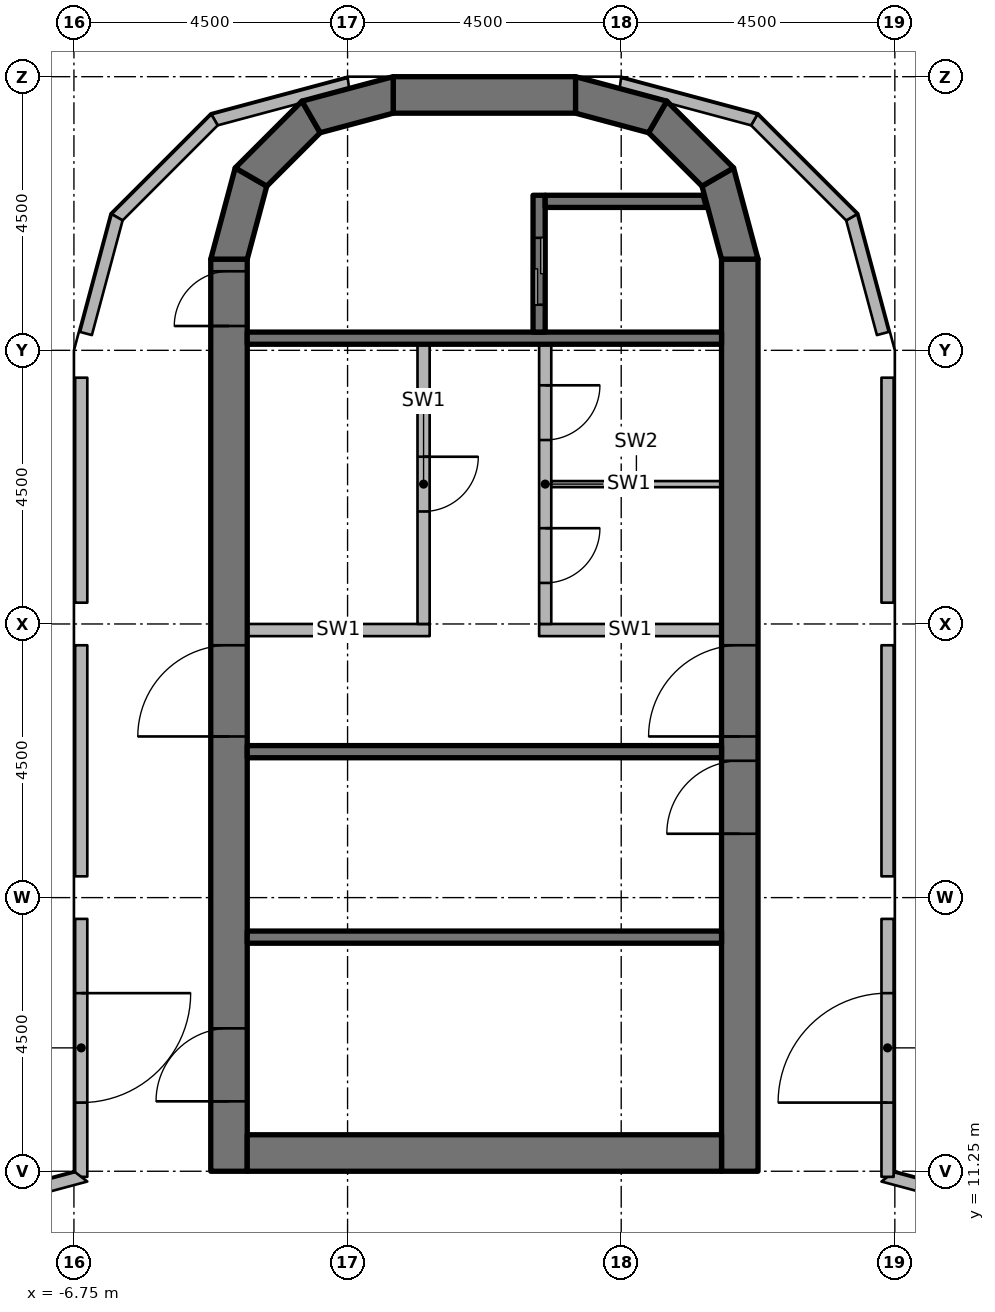
"""IFC4 building model, lengths in metres.
Left out: names, types, materials, properties, quantities, classifications, styles, units other than length and angle.
Written with IfcOpenShell. Run it as: python <this file> out.ifc"""

import sys

from ifc_helpers import new_model, si_unit, direction, frame, frame_2d, origin, origin_2d, place, context, subcontext, project, spatial, polyline, rectangle, outline, extrude, element, fill, save


model = new_model("IFC4")
c1 = context("Model", 3, precision=1e-05, world=origin(), true_north=direction((0.0, 1.0)))
c2 = subcontext(c1, "Body", "Model", "MODEL_VIEW")
j1 = project(units=[si_unit("LENGTHUNIT", "METRE"), si_unit("PLANEANGLEUNIT", "RADIAN")], contexts=[c1])
p1 = place(None, origin())
s1 = spatial("IfcSite", under=j1, at=p1, CompositionType="ELEMENT")
p2 = place(p1, origin())
s2 = spatial("IfcBuilding", under=s1, at=p2, CompositionType="ELEMENT")
p3 = place(p2, frame((0.0, 0.0, 244.8)))
s3 = spatial("IfcBuildingStorey", under=s2, at=p3, CompositionType="ELEMENT", Elevation=244.8)
for number, where, z_axis, x_axis in (
    (1, (-6.25, 10.75, 0.0), (0.0, 0.0, 1.0), (1.0, 0.0, 0.0)),
    (2, (-6.25, 15.75, 0.0), (0.0, 0.0, 1.0), (1.0, 0.0, 0.0)),
    (3, (-6.25, 20.25, 0.0), (0.0, 0.0, 1.0), (1.0, 0.0, 0.0)),
    (4, (-6.25, 24.65, 0.0), (0.0, 0.0, 1.0), (1.0, 0.0, 0.0)),
    (5, (6.25, 10.75, 0.0), (0.0, 0.0, 1.0), (1.0, 0.0, 0.0)),
    (6, (6.25, 15.75, 0.0), (0.0, 0.0, 1.0), (1.0, 0.0, 0.0)),
    (7, (6.25, 20.25, 0.0), (0.0, 0.0, 1.0), (1.0, 0.0, 0.0)),
    (8, (6.25, 24.65, 0.0), (0.0, 0.0, 1.0), (1.0, 0.0, 0.0)),
):
    element("IfcColumn", number, at=place(p3, frame(where, z_axis=z_axis, x_axis=x_axis)), inside=s3, PredefinedType="COLUMN", context=c2, shape_type="SweptSolid", body=[
        extrude(rectangle(XDim=0.7, YDim=0.7, at=origin_2d()), origin(), (0.0, 0.0, 1.0), 4.85),
    ])
p4 = place(p3, frame((-4.2, 11.25, 0.0), z_axis=(0.0, 0.0, 1.0), x_axis=(0.0, 1.0, 0.0)))
e9 = element("IfcWall", 9, at=p4, inside=s3, PredefinedType="SHEAR", context=c2, shape_type="SweptSolid", body=[
    extrude(rectangle(XDim=15.0, YDim=0.6, at=frame_2d((7.5, 0.0))), origin(), (0.0, 0.0, 1.0), 5.0),
])
p5 = place(p4, frame((7.15, 0.0, 0.0)))
e10 = element("IfcOpeningElement", 10, at=p5, cuts=e9, PredefinedType="OPENING", context=c2, shape_type="SweptSolid", body=[
    extrude(rectangle(XDim=1.5, YDim=2.3, at=frame_2d((0.75, 1.15))), frame((0.0, 0.31, 0.0), z_axis=(0.0, -1.0, 0.0), x_axis=(1.0, 0.0, 0.0)), (0.0, 0.0, 1.0), 0.62),
])
p6 = place(p4, frame((13.9, 0.0, 0.0)))
e11 = element("IfcOpeningElement", 11, at=p6, cuts=e9, PredefinedType="OPENING", context=c2, shape_type="SweptSolid", body=[
    extrude(rectangle(XDim=0.9, YDim=2.1, at=frame_2d((0.45, 1.05))), frame((0.0, 0.31, 0.0), z_axis=(0.0, -1.0, 0.0), x_axis=(1.0, 0.0, 0.0)), (0.0, 0.0, 1.0), 0.62),
])
p7 = place(p4, frame((1.15, 0.0, 0.0)))
e12 = element("IfcOpeningElement", 12, at=p7, cuts=e9, PredefinedType="OPENING", context=c2, shape_type="SweptSolid", body=[
    extrude(rectangle(XDim=1.2, YDim=2.1, at=frame_2d((0.6, 1.05))), frame((0.0, 0.31, 0.0), z_axis=(0.0, -1.0, 0.0), x_axis=(1.0, 0.0, 0.0)), (0.0, 0.0, 1.0), 0.62),
])
p8 = place(p3, frame((4.2, 11.25, 0.0), z_axis=(0.0, 0.0, 1.0), x_axis=(0.0, 1.0, 0.0)))
e13 = element("IfcWall", 13, at=p8, inside=s3, PredefinedType="SHEAR", context=c2, shape_type="SweptSolid", body=[
    extrude(rectangle(XDim=15.0, YDim=0.6, at=frame_2d((7.5, 0.0))), origin(), (0.0, 0.0, 1.0), 5.0),
])
p9 = place(p8, frame((7.15, 0.0, 0.0)))
e14 = element("IfcOpeningElement", 14, at=p9, cuts=e13, PredefinedType="OPENING", context=c2, shape_type="SweptSolid", body=[
    extrude(rectangle(XDim=1.5, YDim=2.3, at=frame_2d((0.75, 1.15))), frame((0.0, 0.31, 0.0), z_axis=(0.0, -1.0, 0.0), x_axis=(1.0, 0.0, 0.0)), (0.0, 0.0, 1.0), 0.62),
])
p10 = place(p8, frame((5.55, 0.0, 0.0)))
e15 = element("IfcOpeningElement", 15, at=p10, cuts=e13, PredefinedType="OPENING", context=c2, shape_type="SweptSolid", body=[
    extrude(rectangle(XDim=1.2, YDim=2.1, at=frame_2d((0.6, 1.05))), frame((0.0, 0.31, 0.0), z_axis=(0.0, -1.0, 0.0), x_axis=(1.0, 0.0, 0.0)), (0.0, 0.0, 1.0), 0.62),
])
p11 = place(p3, frame((-3.9, 11.55, 0.0), z_axis=(0.0, 0.0, 1.0), x_axis=(1.0, 0.0, 0.0)))
e16 = element("IfcWall", 16, at=p11, inside=s3, PredefinedType="SHEAR", context=c2, shape_type="SweptSolid", body=[
    extrude(rectangle(XDim=7.8, YDim=0.6, at=frame_2d((3.9, 0.0))), origin(), (0.0, 0.0, 1.0), 5.0),
])
p12 = place(p3, frame((-1.5, 28.95, 0.0), z_axis=(0.0, 0.0, 1.0), x_axis=(1.0, 0.0, 0.0)))
e17 = element("IfcWall", 17, at=p12, inside=s3, PredefinedType="SHEAR", context=c2, shape_type="SweptSolid", body=[
    extrude(rectangle(XDim=3.0, YDim=0.6, at=frame_2d((1.5, 0.0))), origin(), (0.0, 0.0, 1.0), 5.0),
])
p13 = place(p3, origin())
e18 = element("IfcWall", 18, at=p13, inside=s3, PredefinedType="SHEAR", context=c2, shape_type="SweptSolid", body=[
    extrude(outline(polyline([(-4.5, 26.25), (-4.098, 27.75), (-3.579, 27.45), (-3.9, 26.25), (-4.5, 26.25)])), origin(), (0.0, 0.0, 1.0), 5.0),
])
p14 = place(p3, origin())
e19 = element("IfcWall", 19, at=p14, inside=s3, PredefinedType="SHEAR", context=c2, shape_type="SweptSolid", body=[
    extrude(outline(polyline([(-4.098, 27.75), (-3.0, 28.848), (-2.7, 28.329), (-3.579, 27.45), (-4.098, 27.75)])), origin(), (0.0, 0.0, 1.0), 5.0),
])
p15 = place(p3, origin())
e20 = element("IfcWall", 20, at=p15, inside=s3, PredefinedType="SHEAR", context=c2, shape_type="SweptSolid", body=[
    extrude(outline(polyline([(-3.0, 28.848), (-1.5, 29.25), (-1.5, 28.65), (-2.7, 28.329), (-3.0, 28.848)])), origin(), (0.0, 0.0, 1.0), 5.0),
])
p16 = place(p3, origin())
e21 = element("IfcWall", 21, at=p16, inside=s3, PredefinedType="SHEAR", context=c2, shape_type="SweptSolid", body=[
    extrude(outline(polyline([(4.5, 26.25), (4.098, 27.75), (3.579, 27.45), (3.9, 26.25), (4.5, 26.25)])), origin(), (0.0, 0.0, 1.0), 5.0),
])
p17 = place(p3, origin())
e22 = element("IfcWall", 22, at=p17, inside=s3, PredefinedType="SHEAR", context=c2, shape_type="SweptSolid", body=[
    extrude(outline(polyline([(4.098, 27.75), (3.0, 28.848), (2.7, 28.329), (3.579, 27.45), (4.098, 27.75)])), origin(), (0.0, 0.0, 1.0), 5.0),
])
p18 = place(p3, origin())
e23 = element("IfcWall", 23, at=p18, inside=s3, PredefinedType="SHEAR", context=c2, shape_type="SweptSolid", body=[
    extrude(outline(polyline([(3.0, 28.848), (1.5, 29.25), (1.5, 28.65), (2.7, 28.329), (3.0, 28.848)])), origin(), (0.0, 0.0, 1.0), 5.0),
])
p19 = place(p3, origin())
e24 = element("IfcWall", 24, at=p19, inside=s3, PredefinedType="SOLIDWALL", context=c2, shape_type="SweptSolid", body=[
    extrude(outline(polyline([(8.99, 10.629), (6.73, 11.235), (6.53, 11.081), (8.886, 10.45), (8.99, 10.629)])), origin(), (0.0, 0.0, 1.0), 4.85),
])
p20 = place(p3, frame((6.63, 11.158, 0.0), z_axis=(0.0, 0.0, 1.0), x_axis=(0.0, 1.0, 0.0)))
e25 = element("IfcWall", 25, at=p20, inside=s3, PredefinedType="SOLIDWALL", context=c2, shape_type="SweptSolid", body=[
    extrude(rectangle(XDim=4.242, YDim=0.2, at=frame_2d((2.121, 0.0))), origin(), (0.0, 0.0, 1.0), 4.85),
])
p21 = place(p20, frame((1.221, 0.0, 0.0)))
e26 = element("IfcOpeningElement", 26, at=p21, cuts=e25, PredefinedType="OPENING", context=c2, shape_type="SweptSolid", body=[
    extrude(rectangle(XDim=1.8, YDim=2.4, at=frame_2d((0.9, 1.2))), frame((0.0, 0.11, 0.0), z_axis=(0.0, -1.0, 0.0), x_axis=(1.0, 0.0, 0.0)), (0.0, 0.0, 1.0), 0.22),
])
p22 = place(p3, origin())
e27 = element("IfcWall", 27, at=p22, inside=s3, PredefinedType="SOLIDWALL", context=c2, shape_type="SweptSolid", body=[
    extrude(outline(polyline([(6.73, 16.1), (6.73, 19.9), (6.53, 19.9), (6.53, 16.1), (6.73, 16.1)])), origin(), (0.0, 0.0, 1.0), 4.85),
])
p23 = place(p3, origin())
e28 = element("IfcWall", 28, at=p23, inside=s3, PredefinedType="SOLIDWALL", context=c2, shape_type="SweptSolid", body=[
    extrude(outline(polyline([(6.73, 20.6), (6.73, 24.3), (6.53, 24.3), (6.53, 20.6), (6.73, 20.6)])), origin(), (0.0, 0.0, 1.0), 4.85),
])
p24 = place(p3, origin())
e29 = element("IfcWall", 29, at=p24, inside=s3, PredefinedType="SOLIDWALL", context=c2, shape_type="SweptSolid", body=[
    extrude(outline(polyline([(6.648, 25.052), (6.129, 26.99), (5.95, 26.886), (6.455, 25.0), (6.648, 25.052)])), origin(), (0.0, 0.0, 1.0), 4.85),
])
p25 = place(p3, origin())
e30 = element("IfcWall", 30, at=p25, inside=s3, PredefinedType="SOLIDWALL", context=c2, shape_type="SweptSolid", body=[
    extrude(outline(polyline([(6.129, 26.99), (4.49, 28.629), (4.386, 28.45), (5.95, 26.886), (6.129, 26.99)])), origin(), (0.0, 0.0, 1.0), 4.85),
])
p26 = place(p3, origin())
e31 = element("IfcWall", 31, at=p26, inside=s3, PredefinedType="SOLIDWALL", context=c2, shape_type="SweptSolid", body=[
    extrude(outline(polyline([(2.247, 29.23), (2.224, 29.056), (3.0, 28.848), (3.037, 28.812), (4.386, 28.45), (4.49, 28.629), (2.247, 29.23)])), origin(), (0.0, 0.0, 1.0), 4.85),
])
p27 = place(p3, origin())
e32 = element("IfcWall", 32, at=p27, inside=s3, PredefinedType="SOLIDWALL", context=c2, shape_type="SweptSolid", body=[
    extrude(outline(polyline([(-4.386, 28.45), (-3.037, 28.812), (-3.0, 28.848), (-2.224, 29.056), (-2.247, 29.23), (-4.49, 28.629), (-4.386, 28.45)])), origin(), (0.0, 0.0, 1.0), 4.85),
])
p28 = place(p3, origin())
e33 = element("IfcWall", 33, at=p28, inside=s3, PredefinedType="SOLIDWALL", context=c2, shape_type="SweptSolid", body=[
    extrude(outline(polyline([(-4.49, 28.629), (-6.129, 26.99), (-5.95, 26.886), (-4.386, 28.45), (-4.49, 28.629)])), origin(), (0.0, 0.0, 1.0), 4.85),
])
p29 = place(p3, origin())
e34 = element("IfcWall", 34, at=p29, inside=s3, PredefinedType="SOLIDWALL", context=c2, shape_type="SweptSolid", body=[
    extrude(outline(polyline([(-6.129, 26.99), (-6.648, 25.052), (-6.455, 25.001), (-5.95, 26.886), (-6.129, 26.99)])), origin(), (0.0, 0.0, 1.0), 4.85),
])
p30 = place(p3, origin())
e35 = element("IfcWall", 35, at=p30, inside=s3, PredefinedType="SOLIDWALL", context=c2, shape_type="SweptSolid", body=[
    extrude(outline(polyline([(-6.73, 24.3), (-6.73, 20.6), (-6.53, 20.6), (-6.53, 24.3), (-6.73, 24.3)])), origin(), (0.0, 0.0, 1.0), 4.85),
])
p31 = place(p3, origin())
e36 = element("IfcWall", 36, at=p31, inside=s3, PredefinedType="SOLIDWALL", context=c2, shape_type="SweptSolid", body=[
    extrude(outline(polyline([(-6.73, 19.9), (-6.73, 16.1), (-6.53, 16.1), (-6.53, 19.9), (-6.73, 19.9)])), origin(), (0.0, 0.0, 1.0), 4.85),
])
p32 = place(p3, frame((-6.63, 15.4, 0.0), z_axis=(0.0, 0.0, 1.0), x_axis=(0.0, -1.0, 0.0)))
e37 = element("IfcWall", 37, at=p32, inside=s3, PredefinedType="SOLIDWALL", context=c2, shape_type="SweptSolid", body=[
    extrude(rectangle(XDim=4.242, YDim=0.2, at=frame_2d((2.121, 0.0))), origin(), (0.0, 0.0, 1.0), 4.85),
])
p33 = place(p32, frame((1.221, 0.0, 0.0)))
e38 = element("IfcOpeningElement", 38, at=p33, cuts=e37, PredefinedType="OPENING", context=c2, shape_type="SweptSolid", body=[
    extrude(rectangle(XDim=1.8, YDim=2.4, at=frame_2d((0.9, 1.2))), frame((0.0, 0.11, 0.0), z_axis=(0.0, -1.0, 0.0), x_axis=(1.0, 0.0, 0.0)), (0.0, 0.0, 1.0), 0.22),
])
p34 = place(p3, origin())
e39 = element("IfcWall", 39, at=p34, inside=s3, PredefinedType="SOLIDWALL", context=c2, shape_type="SweptSolid", body=[
    extrude(outline(polyline([(-6.73, 11.235), (-8.99, 10.629), (-8.886, 10.45), (-6.53, 11.081), (-6.73, 11.235)])), origin(), (0.0, 0.0, 1.0), 4.85),
])
p35 = place(p3, frame((-3.9, 24.95, 0.0), z_axis=(0.0, 0.0, 1.0), x_axis=(1.0, 0.0, 0.0)))
e40 = element("IfcWall", 40, at=p35, inside=s3, PredefinedType="SHEAR", context=c2, shape_type="SweptSolid", body=[
    extrude(rectangle(XDim=7.8, YDim=0.2, at=frame_2d((3.9, 0.0))), origin(), (0.0, 0.0, 1.0), 4.85),
])
p36 = place(p3, frame((0.9, 27.3, 0.0), z_axis=(0.0, 0.0, 1.0), x_axis=(0.0, -1.0, 0.0)))
e41 = element("IfcWall", 41, at=p36, inside=s3, PredefinedType="SHEAR", context=c2, shape_type="SweptSolid", body=[
    extrude(rectangle(XDim=2.25, YDim=0.2, at=frame_2d((1.125, 0.0))), origin(), (0.0, 0.0, 1.0), 4.85),
])
p37 = place(p36, frame((0.7, 0.0, 0.0)))
e42 = element("IfcOpeningElement", 42, at=p37, cuts=e41, PredefinedType="OPENING", context=c2, shape_type="SweptSolid", body=[
    extrude(rectangle(XDim=1.1, YDim=2.3, at=frame_2d((0.55, 1.15))), frame((0.0, 0.11, 0.0), z_axis=(0.0, -1.0, 0.0), x_axis=(1.0, 0.0, 0.0)), (0.0, 0.0, 1.0), 0.22),
])
p38 = place(p3, origin())
e43 = element("IfcWall", 43, at=p38, inside=s3, PredefinedType="SHEAR", context=c2, shape_type="SweptSolid", body=[
    extrude(outline(polyline([(1.0, 27.1), (3.651, 27.1), (3.597, 27.3), (1.0, 27.3), (1.0, 27.1)])), origin(), (0.0, 0.0, 1.0), 4.85),
])
for number, where, z_axis, x_axis in (
    (44, (-3.9, 18.15, 0.0), (0.0, 0.0, 1.0), (1.0, 0.0, 0.0)),
    (45, (-3.9, 15.1, 0.0), (0.0, 0.0, 1.0), (1.0, 0.0, 0.0)),
):
    element("IfcWall", number, at=place(p3, frame(where, z_axis=z_axis, x_axis=x_axis)), inside=s3, PredefinedType="SHEAR", context=c2, shape_type="SweptSolid", body=[
        extrude(rectangle(XDim=7.8, YDim=0.2, at=frame_2d((3.9, 0.0))), origin(), (0.0, 0.0, 1.0), 4.85),
    ])
p39 = place(p3, frame((-3.9, 20.15, 0.0), z_axis=(0.0, 0.0, 1.0), x_axis=(1.0, 0.0, 0.0)))
e46 = element("IfcWall", 46, at=p39, inside=s3, PredefinedType="PARTITIONING", context=c2, shape_type="SweptSolid", body=[
    extrude(rectangle(XDim=3.0, YDim=0.2, at=frame_2d((1.5, 0.0))), origin(), (0.0, 0.0, 1.0), 4.85),
])
p40 = place(p3, frame((-1.0, 24.85, 0.0), z_axis=(0.0, 0.0, 1.0), x_axis=(0.0, -1.0, 0.0)))
e47 = element("IfcWall", 47, at=p40, inside=s3, PredefinedType="PARTITIONING", context=c2, shape_type="SweptSolid", body=[
    extrude(rectangle(XDim=4.6, YDim=0.2, at=frame_2d((2.3, 0.0))), origin(), (0.0, 0.0, 1.0), 4.85),
])
p41 = place(p40, frame((1.85, 0.0, 0.0)))
e48 = element("IfcOpeningElement", 48, at=p41, cuts=e47, PredefinedType="OPENING", context=c2, shape_type="SweptSolid", body=[
    extrude(rectangle(XDim=0.9, YDim=2.1, at=frame_2d((0.45, 1.05))), frame((0.0, 0.11, 0.0), z_axis=(0.0, -1.0, 0.0), x_axis=(1.0, 0.0, 0.0)), (0.0, 0.0, 1.0), 0.22),
])
p42 = place(p3, frame((0.9, 20.15, 0.0), z_axis=(0.0, 0.0, 1.0), x_axis=(1.0, 0.0, 0.0)))
e49 = element("IfcWall", 49, at=p42, inside=s3, PredefinedType="PARTITIONING", context=c2, shape_type="SweptSolid", body=[
    extrude(rectangle(XDim=3.0, YDim=0.2, at=frame_2d((1.5, 0.0))), origin(), (0.0, 0.0, 1.0), 4.85),
])
p43 = place(p3, frame((1.0, 24.85, 0.0), z_axis=(0.0, 0.0, 1.0), x_axis=(0.0, -1.0, 0.0)))
e50 = element("IfcWall", 50, at=p43, inside=s3, PredefinedType="PARTITIONING", context=c2, shape_type="SweptSolid", body=[
    extrude(rectangle(XDim=4.6, YDim=0.2, at=frame_2d((2.3, 0.0))), origin(), (0.0, 0.0, 1.0), 4.85),
])
p44 = place(p43, frame((0.675, 0.0, 0.0)))
e51 = element("IfcOpeningElement", 51, at=p44, cuts=e50, PredefinedType="OPENING", context=c2, shape_type="SweptSolid", body=[
    extrude(rectangle(XDim=0.9, YDim=2.1, at=frame_2d((0.45, 1.05))), frame((0.0, 0.11, 0.0), z_axis=(0.0, -1.0, 0.0), x_axis=(1.0, 0.0, 0.0)), (0.0, 0.0, 1.0), 0.22),
])
p45 = place(p43, frame((3.025, 0.0, 0.0)))
e52 = element("IfcOpeningElement", 52, at=p45, cuts=e50, PredefinedType="OPENING", context=c2, shape_type="SweptSolid", body=[
    extrude(rectangle(XDim=0.9, YDim=2.1, at=frame_2d((0.45, 1.05))), frame((0.0, 0.11, 0.0), z_axis=(0.0, -1.0, 0.0), x_axis=(1.0, 0.0, 0.0)), (0.0, 0.0, 1.0), 0.22),
])
p46 = place(p3, frame((1.1, 22.55, 0.0), z_axis=(0.0, 0.0, 1.0), x_axis=(1.0, 0.0, 0.0)))
e53 = element("IfcWall", 53, at=p46, inside=s3, PredefinedType="PARTITIONING", context=c2, shape_type="SweptSolid", body=[
    extrude(rectangle(XDim=2.8, YDim=0.1, at=frame_2d((1.4, 0.0))), origin(), (0.0, 0.0, 1.0), 4.85),
])
p47 = place(p21, origin())
e54 = element("IfcDoor", 54, at=p47, inside=s3, OperationType="SINGLE_SWING_LEFT", PredefinedType="DOOR", context=c2, shape_type="SweptSolid", body=[
    extrude(rectangle(XDim=1.8, YDim=2.4, at=frame_2d((0.9, 1.2))), frame((0.0, 0.025, 0.0), z_axis=(0.0, -1.0, 0.0), x_axis=(1.0, 0.0, 0.0)), (0.0, 0.0, 1.0), 0.05),
])
fill(e26, e54)
p48 = place(p33, origin())
e55 = element("IfcDoor", 55, at=p48, inside=s3, OperationType="SINGLE_SWING_LEFT", PredefinedType="DOOR", context=c2, shape_type="SweptSolid", body=[
    extrude(rectangle(XDim=1.8, YDim=2.4, at=frame_2d((0.9, 1.2))), frame((0.0, 0.025, 0.0), z_axis=(0.0, -1.0, 0.0), x_axis=(1.0, 0.0, 0.0)), (0.0, 0.0, 1.0), 0.05),
])
fill(e38, e55)
p49 = place(p5, origin())
e56 = element("IfcDoor", 56, at=p49, inside=s3, OperationType="DOUBLE_DOOR_SINGLE_SWING", PredefinedType="DOOR", context=c2, shape_type="SweptSolid", body=[
    extrude(rectangle(XDim=1.5, YDim=2.3, at=frame_2d((0.75, 1.15))), frame((0.0, 0.025, 0.0), z_axis=(0.0, -1.0, 0.0), x_axis=(1.0, 0.0, 0.0)), (0.0, 0.0, 1.0), 0.05),
])
fill(e10, e56)
p50 = place(p9, origin())
e57 = element("IfcDoor", 57, at=p50, inside=s3, OperationType="DOUBLE_DOOR_SINGLE_SWING", PredefinedType="DOOR", context=c2, shape_type="SweptSolid", body=[
    extrude(rectangle(XDim=1.5, YDim=2.3, at=frame_2d((0.75, 1.15))), frame((0.0, 0.025, 0.0), z_axis=(0.0, -1.0, 0.0), x_axis=(1.0, 0.0, 0.0)), (0.0, 0.0, 1.0), 0.05),
])
fill(e14, e57)
p51 = place(p6, origin())
e58 = element("IfcDoor", 58, at=p51, inside=s3, OperationType="SINGLE_SWING_LEFT", PredefinedType="DOOR", context=c2, shape_type="SweptSolid", body=[
    extrude(rectangle(XDim=0.9, YDim=2.1, at=frame_2d((0.45, 1.05))), frame((0.0, 0.025, 0.0), z_axis=(0.0, -1.0, 0.0), x_axis=(1.0, 0.0, 0.0)), (0.0, 0.0, 1.0), 0.05),
])
fill(e11, e58)
p52 = place(p10, origin())
e59 = element("IfcDoor", 59, at=p52, inside=s3, OperationType="SINGLE_SWING_RIGHT", PredefinedType="DOOR", context=c2, shape_type="SweptSolid", body=[
    extrude(rectangle(XDim=1.2, YDim=2.1, at=frame_2d((0.6, 1.05))), frame((0.0, 0.025, 0.0), z_axis=(0.0, -1.0, 0.0), x_axis=(1.0, 0.0, 0.0)), (0.0, 0.0, 1.0), 0.05),
])
fill(e15, e59)
p53 = place(p7, origin())
e60 = element("IfcDoor", 60, at=p53, inside=s3, OperationType="SINGLE_SWING_LEFT", PredefinedType="DOOR", context=c2, shape_type="SweptSolid", body=[
    extrude(rectangle(XDim=1.2, YDim=2.1, at=frame_2d((0.6, 1.05))), frame((0.0, 0.025, 0.0), z_axis=(0.0, -1.0, 0.0), x_axis=(1.0, 0.0, 0.0)), (0.0, 0.0, 1.0), 0.05),
])
fill(e12, e60)
p54 = place(p37, origin())
e61 = element("IfcDoor", 61, at=p54, inside=s3, OperationType="DOUBLE_DOOR_SLIDING", PredefinedType="DOOR", context=c2, shape_type="SweptSolid", body=[
    extrude(rectangle(XDim=1.1, YDim=2.3, at=frame_2d((0.55, 1.15))), frame((0.0, 0.025, 0.0), z_axis=(0.0, -1.0, 0.0), x_axis=(1.0, 0.0, 0.0)), (0.0, 0.0, 1.0), 0.05),
])
fill(e42, e61)
p55 = place(p41, origin())
e62 = element("IfcDoor", 62, at=p55, inside=s3, OperationType="SINGLE_SWING_LEFT", PredefinedType="DOOR", context=c2, shape_type="SweptSolid", body=[
    extrude(rectangle(XDim=0.9, YDim=2.1, at=frame_2d((0.45, 1.05))), frame((0.0, 0.025, 0.0), z_axis=(0.0, -1.0, 0.0), x_axis=(1.0, 0.0, 0.0)), (0.0, 0.0, 1.0), 0.05),
])
fill(e48, e62)
p56 = place(p44, origin())
e63 = element("IfcDoor", 63, at=p56, inside=s3, OperationType="SINGLE_SWING_LEFT", PredefinedType="DOOR", context=c2, shape_type="SweptSolid", body=[
    extrude(rectangle(XDim=0.9, YDim=2.1, at=frame_2d((0.45, 1.05))), frame((0.0, 0.025, 0.0), z_axis=(0.0, -1.0, 0.0), x_axis=(1.0, 0.0, 0.0)), (0.0, 0.0, 1.0), 0.05),
])
fill(e51, e63)
p57 = place(p45, origin())
e64 = element("IfcDoor", 64, at=p57, inside=s3, OperationType="SINGLE_SWING_RIGHT", PredefinedType="DOOR", context=c2, shape_type="SweptSolid", body=[
    extrude(rectangle(XDim=0.9, YDim=2.1, at=frame_2d((0.45, 1.05))), frame((0.0, 0.025, 0.0), z_axis=(0.0, -1.0, 0.0), x_axis=(1.0, 0.0, 0.0)), (0.0, 0.0, 1.0), 0.05),
])
fill(e52, e64)
save(model, sys.argv[1])
